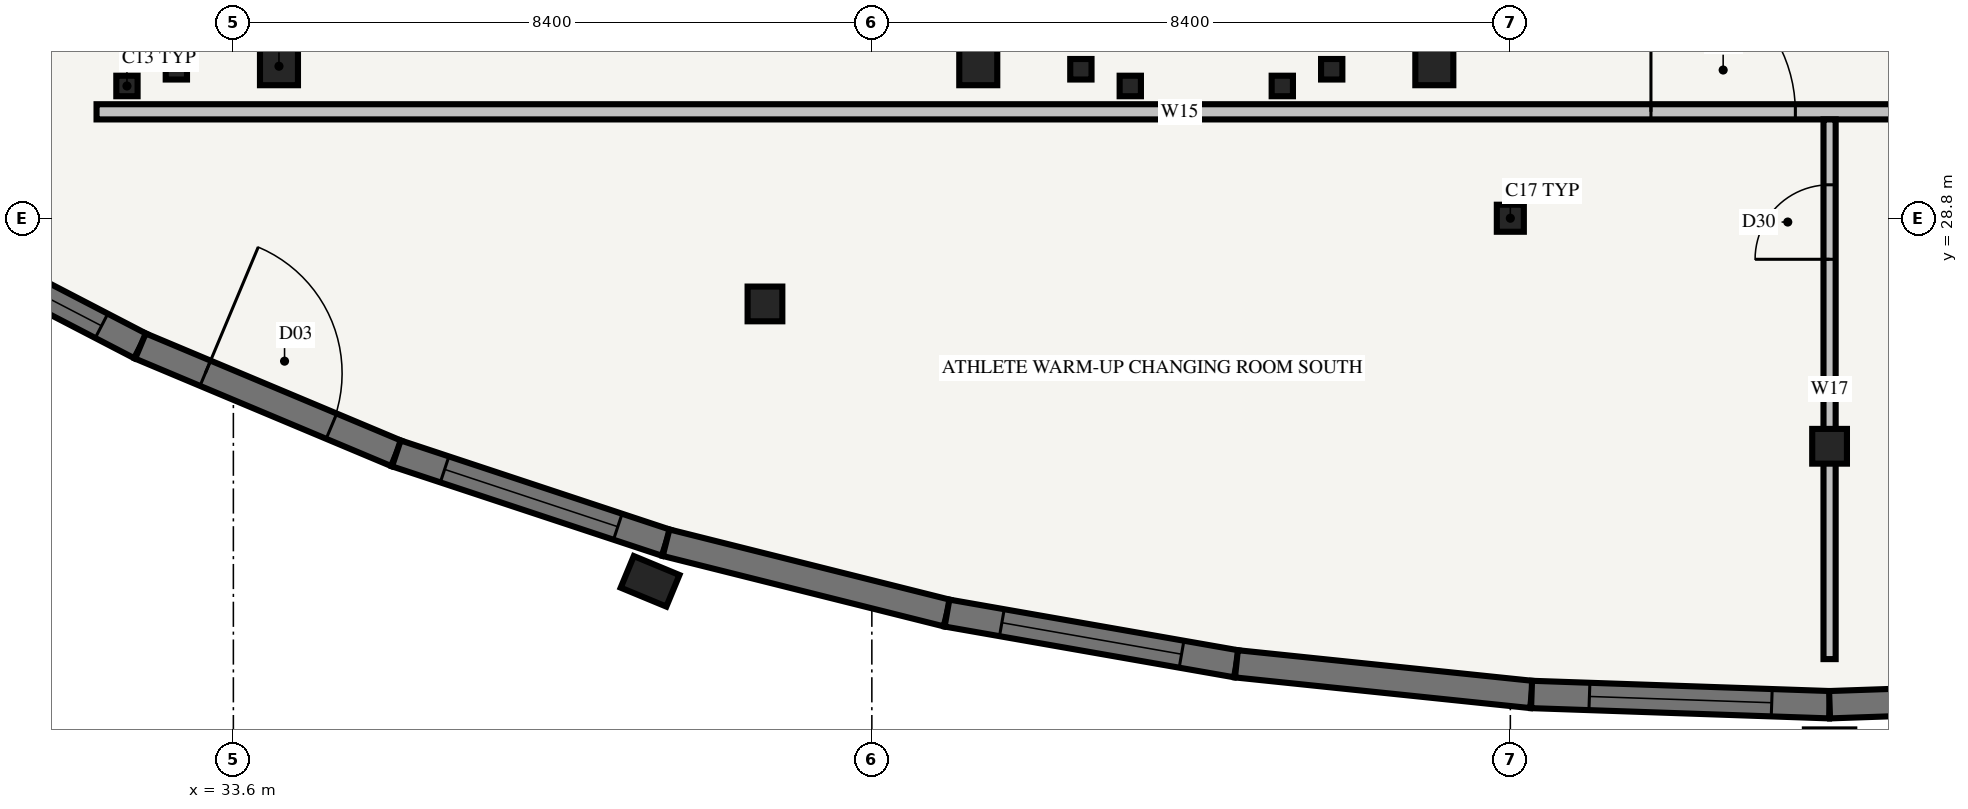
"""IFC4 building model, lengths in metres.
Left out: names, types, materials, properties, quantities, classifications, styles, units other than length and angle.
Written with IfcOpenShell. Run it as: python <this file> out.ifc"""

import sys

from ifc_helpers import new_model, si_unit, direction, frame, frame_2d, origin, origin_2d, place, context, subcontext, project, spatial, rectangle, hollow_circle, i_section, extrude, element, fill, save


model = new_model("IFC4")
c1 = context("Model", 3, precision=1e-05, world=origin(), true_north=direction((0.0, 1.0)))
c2 = subcontext(c1, "Body", "Model", "MODEL_VIEW")
j1 = project(units=[si_unit("LENGTHUNIT", "METRE"), si_unit("PLANEANGLEUNIT", "RADIAN")], contexts=[c1])
p1 = place(None, origin())
s1 = spatial("IfcSite", under=j1, at=p1, CompositionType="ELEMENT")
p2 = place(p1, origin())
s2 = spatial("IfcBuilding", under=s1, at=p2, CompositionType="ELEMENT")
p3 = place(p2, origin())
s3 = spatial("IfcBuildingStorey", under=s2, at=p3, CompositionType="ELEMENT", Elevation=0.0)
for number, where, z_axis, x_axis in (
    (1, (32.2, 30.54, 0.0), (0.0, 0.0, 1.0), (1.0, 0.0, 0.0)),
    (2, (45.4, 30.54, 0.0), (0.0, 0.0, 1.0), (1.0, 0.0, 0.0)),
    (3, (32.85, 30.76, 0.0), (0.0, 0.0, 1.0), (1.0, 0.0, 0.0)),
    (4, (44.75, 30.76, 0.0), (0.0, 0.0, 1.0), (1.0, 0.0, 0.0)),
    (5, (47.4, 30.54, 0.0), (0.0, 0.0, 1.0), (1.0, 0.0, 0.0)),
    (6, (48.05, 30.76, 0.0), (0.0, 0.0, 1.0), (1.0, 0.0, 0.0)),
):
    element("IfcColumn", number, at=place(p3, frame(where, z_axis=z_axis, x_axis=x_axis)), inside=s3, PredefinedType="COLUMN", context=c2, shape_type="SweptSolid", body=[
        extrude(i_section(OverallWidth=0.28, OverallDepth=0.27, WebThickness=0.008, FlangeThickness=0.013, FilletRadius=0.024, at=origin_2d()), origin(), (0.0, 0.0, 1.0), 3.99),
    ])
p4 = place(p3, frame((40.594, 27.673, -0.42), z_axis=(0.0, 0.0, 1.0), x_axis=(1.0, 0.0, 0.0)))
e7 = element("IfcColumn", 7, at=p4, inside=s3, PredefinedType="COLUMN", context=c2, shape_type="SweptSolid", body=[
    extrude(hollow_circle(Radius=0.229, WallThickness=0.02, at=origin_2d()), origin(), (0.0, 0.0, 1.0), 4.92),
])
p5 = place(p3, frame((39.082, 24.023, -0.42), z_axis=(0.0, 0.0, 1.0), x_axis=(-0.382683432365, -0.923879532511, 0.0)))
e8 = element("IfcColumn", 8, at=p5, inside=s3, PredefinedType="PILASTER", context=c2, shape_type="SweptSolid", body=[
    extrude(rectangle(XDim=0.45, YDim=0.65, at=origin_2d()), origin(), (0.0, 0.0, 1.0), 4.92),
])
p6 = place(p3, frame((54.6, 25.8, -0.42), z_axis=(0.0, 0.0, 1.0), x_axis=(1.0, 0.0, 0.0)))
e9 = element("IfcColumn", 9, at=p6, inside=s3, PredefinedType="COLUMN", context=c2, shape_type="SweptSolid", body=[
    extrude(hollow_circle(Radius=0.229, WallThickness=0.02, at=origin_2d()), origin(), (0.0, 0.0, 1.0), 4.92),
])
p7 = place(p3, frame((50.4, 28.8, -0.42), z_axis=(0.0, 0.0, 1.0), x_axis=(1.0, 0.0, 0.0)))
e10 = element("IfcColumn", 10, at=p7, inside=s3, PredefinedType="COLUMN", context=c2, shape_type="SweptSolid", body=[
    extrude(hollow_circle(Radius=0.178, WallThickness=0.016, at=origin_2d()), origin(), (0.0, 0.0, 1.0), 4.92),
])
for number, where, z_axis, x_axis in (
    (11, (34.2, 30.8, 0.0), (0.0, 0.0, 1.0), (1.0, 0.0, 0.0)),
    (12, (43.4, 30.8, 0.0), (0.0, 0.0, 1.0), (1.0, 0.0, 0.0)),
    (13, (49.4, 30.8, 0.0), (0.0, 0.0, 1.0), (1.0, 0.0, 0.0)),
):
    element("IfcColumn", number, at=place(p3, frame(where, z_axis=z_axis, x_axis=x_axis)), inside=s3, PredefinedType="COLUMN", context=c2, shape_type="SweptSolid", body=[
        extrude(rectangle(XDim=0.5, YDim=0.5, at=origin_2d()), origin(), (0.0, 0.0, 1.0), 3.63),
    ])
p8 = place(p3, frame((29.224, 28.756, 0.0), z_axis=(0.0, 0.0, 1.0), x_axis=(0.887533910416, -0.460742398593, 0.0)))
e14 = element("IfcWall", 14, at=p8, inside=s3, PredefinedType="STANDARD", context=c2, shape_type="SweptSolid", body=[
    extrude(rectangle(XDim=3.552, YDim=0.36, at=frame_2d((1.776, 0.0))), origin(), (0.0, 0.0, 1.0), 4.01),
])
p9 = place(p8, frame((0.576, 0.0, 2.65)))
e15 = element("IfcOpeningElement", 15, at=p9, cuts=e14, PredefinedType="OPENING", context=c2, shape_type="SweptSolid", body=[
    extrude(rectangle(XDim=2.4, YDim=1.1, at=frame_2d((1.2, 0.55))), frame((0.0, 0.205, 0.0), z_axis=(0.0, -1.0, 0.0), x_axis=(1.0, 0.0, 0.0)), (0.0, 0.0, 1.0), 0.41),
])
p10 = place(p3, frame((32.377, 27.119, 0.0), z_axis=(0.0, 0.0, 1.0), x_axis=(0.922130522386, -0.386878921219, 0.0)))
e16 = element("IfcWall", 16, at=p10, inside=s3, PredefinedType="STANDARD", context=c2, shape_type="SweptSolid", body=[
    extrude(rectangle(XDim=3.651, YDim=0.36, at=frame_2d((1.826, 0.0))), origin(), (0.0, 0.0, 1.0), 4.01),
])
p11 = place(p10, frame((0.926, 0.0, 0.0)))
e17 = element("IfcOpeningElement", 17, at=p11, cuts=e16, PredefinedType="OPENING", context=c2, shape_type="SweptSolid", body=[
    extrude(rectangle(XDim=1.8, YDim=2.4, at=frame_2d((0.9, 1.2))), frame((0.0, 0.205, 0.0), z_axis=(0.0, -1.0, 0.0), x_axis=(1.0, 0.0, 0.0)), (0.0, 0.0, 1.0), 0.41),
])
p12 = place(p3, frame((35.744, 25.706, 0.0), z_axis=(0.0, 0.0, 1.0), x_axis=(0.949327915917, -0.314287301781, 0.0)))
e18 = element("IfcWall", 18, at=p12, inside=s3, PredefinedType="STANDARD", context=c2, shape_type="SweptSolid", body=[
    extrude(rectangle(XDim=3.738, YDim=0.36, at=frame_2d((1.869, 0.0))), origin(), (0.0, 0.0, 1.0), 4.01),
])
p13 = place(p12, frame((0.669, 0.0, 2.65)))
e19 = element("IfcOpeningElement", 19, at=p13, cuts=e18, PredefinedType="OPENING", context=c2, shape_type="SweptSolid", body=[
    extrude(rectangle(XDim=2.4, YDim=1.1, at=frame_2d((1.2, 0.55))), frame((0.0, 0.205, 0.0), z_axis=(0.0, -1.0, 0.0), x_axis=(1.0, 0.0, 0.0)), (0.0, 0.0, 1.0), 0.41),
])
p14 = place(p3, frame((39.293, 24.531, 0.0), z_axis=(0.0, 0.0, 1.0), x_axis=(0.970029313946, -0.242987921686, 0.0)))
e20 = element("IfcWall", 20, at=p14, inside=s3, PredefinedType="STANDARD", context=c2, shape_type="SweptSolid", body=[
    extrude(rectangle(XDim=3.81, YDim=0.36, at=frame_2d((1.905, 0.0))), origin(), (0.0, 0.0, 1.0), 4.01),
])
p15 = place(p3, frame((42.989, 23.606, 0.0), z_axis=(0.0, 0.0, 1.0), x_axis=(0.984971163925, -0.172718864739, 0.0)))
e21 = element("IfcWall", 21, at=p15, inside=s3, PredefinedType="STANDARD", context=c2, shape_type="SweptSolid", body=[
    extrude(rectangle(XDim=3.866, YDim=0.36, at=frame_2d((1.933, 0.0))), origin(), (0.0, 0.0, 1.0), 4.01),
])
p16 = place(p15, frame((0.733, 0.0, 2.65)))
e22 = element("IfcOpeningElement", 22, at=p16, cuts=e21, PredefinedType="OPENING", context=c2, shape_type="SweptSolid", body=[
    extrude(rectangle(XDim=2.4, YDim=1.1, at=frame_2d((1.2, 0.55))), frame((0.0, 0.205, 0.0), z_axis=(0.0, -1.0, 0.0), x_axis=(1.0, 0.0, 0.0)), (0.0, 0.0, 1.0), 0.41),
])
p17 = place(p3, frame((46.796, 22.938, 0.0), z_axis=(0.0, 0.0, 1.0), x_axis=(0.994654867494, -0.103255482032, 0.0)))
e23 = element("IfcWall", 23, at=p17, inside=s3, PredefinedType="STANDARD", context=c2, shape_type="SweptSolid", body=[
    extrude(rectangle(XDim=3.904, YDim=0.36, at=frame_2d((1.952, 0.0))), origin(), (0.0, 0.0, 1.0), 4.01),
])
p18 = place(p3, frame((50.679, 22.535, 0.0), z_axis=(0.0, 0.0, 1.0), x_axis=(0.999407697997, -0.034412979887, 0.0)))
e24 = element("IfcWall", 24, at=p18, inside=s3, PredefinedType="STANDARD", context=c2, shape_type="SweptSolid", body=[
    extrude(rectangle(XDim=3.923, YDim=0.36, at=frame_2d((1.962, 0.0))), origin(), (0.0, 0.0, 1.0), 4.01),
])
p19 = place(p18, frame((0.761, 0.0, 2.65)))
e25 = element("IfcOpeningElement", 25, at=p19, cuts=e24, PredefinedType="OPENING", context=c2, shape_type="SweptSolid", body=[
    extrude(rectangle(XDim=2.4, YDim=1.1, at=frame_2d((1.2, 0.55))), frame((0.0, 0.205, 0.0), z_axis=(0.0, -1.0, 0.0), x_axis=(1.0, 0.0, 0.0)), (0.0, 0.0, 1.0), 0.41),
])
p20 = place(p3, frame((54.6, 22.4, 0.0), z_axis=(0.0, 0.0, 1.0), x_axis=(0.999407624294, 0.034415120259, 0.0)))
e26 = element("IfcWall", 26, at=p20, inside=s3, PredefinedType="STANDARD", context=c2, shape_type="SweptSolid", body=[
    extrude(rectangle(XDim=3.923, YDim=0.36, at=frame_2d((1.961, 0.0))), origin(), (0.0, 0.0, 1.0), 4.01),
])
p21 = place(p3, frame((31.8, 30.2, 0.0), z_axis=(0.0, 0.0, 1.0), x_axis=(1.0, 0.0, 0.0)))
e27 = element("IfcWall", 27, at=p21, inside=s3, PredefinedType="PARTITIONING", context=c2, shape_type="SweptSolid", body=[
    extrude(rectangle(XDim=45.6, YDim=0.2, at=frame_2d((22.8, 0.0))), origin(), (0.0, 0.0, 1.0), 3.62),
])
p22 = place(p21, frame((20.45, 0.0, 0.0)))
e28 = element("IfcOpeningElement", 28, at=p22, cuts=e27, PredefinedType="OPENING", context=c2, shape_type="SweptSolid", body=[
    extrude(rectangle(XDim=1.9, YDim=2.35, at=frame_2d((0.95, 1.175))), frame((0.0, 0.125, 0.0), z_axis=(0.0, -1.0, 0.0), x_axis=(1.0, 0.0, 0.0)), (0.0, 0.0, 1.0), 0.25),
])
p23 = place(p3, frame((54.6, 23.0, 0.0), z_axis=(0.0, 0.0, 1.0), x_axis=(0.0, 1.0, 0.0)))
e29 = element("IfcWall", 29, at=p23, inside=s3, PredefinedType="PARTITIONING", context=c2, shape_type="SweptSolid", body=[
    extrude(rectangle(XDim=7.1, YDim=0.16, at=frame_2d((3.55, 0.0))), origin(), (0.0, 0.0, 1.0), 3.62),
])
p24 = place(p23, frame((5.26, 0.0, 0.0)))
e30 = element("IfcOpeningElement", 30, at=p24, cuts=e29, PredefinedType="OPENING", context=c2, shape_type="SweptSolid", body=[
    extrude(rectangle(XDim=0.98, YDim=2.1, at=frame_2d((0.49, 1.05))), frame((0.0, 0.105, 0.0), z_axis=(0.0, -1.0, 0.0), x_axis=(1.0, 0.0, 0.0)), (0.0, 0.0, 1.0), 0.21),
])
p25 = place(p9, origin())
e31 = element("IfcWindow", 31, at=p25, inside=s3, PartitioningType="SINGLE_PANEL", PredefinedType="WINDOW", context=c2, shape_type="SweptSolid", body=[
    extrude(rectangle(XDim=2.4, YDim=1.1, at=frame_2d((1.2, 0.55))), frame((0.0, 0.03, 0.0), z_axis=(0.0, -1.0, 0.0), x_axis=(1.0, 0.0, 0.0)), (0.0, 0.0, 1.0), 0.06),
])
fill(e15, e31)
p26 = place(p11, frame((1.8, 0.0, 0.0), z_axis=(0.0, 0.0, 1.0), x_axis=(-1.0, 0.0, 0.0)))
e32 = element("IfcDoor", 32, at=p26, inside=s3, OperationType="DOUBLE_DOOR_SINGLE_SWING", PredefinedType="DOOR", context=c2, shape_type="SweptSolid", body=[
    extrude(rectangle(XDim=1.8, YDim=2.4, at=frame_2d((0.9, 1.2))), frame((0.0, 0.025, 0.0), z_axis=(0.0, -1.0, 0.0), x_axis=(1.0, 0.0, 0.0)), (0.0, 0.0, 1.0), 0.05),
])
fill(e17, e32)
p27 = place(p13, origin())
e33 = element("IfcWindow", 33, at=p27, inside=s3, PartitioningType="SINGLE_PANEL", PredefinedType="WINDOW", context=c2, shape_type="SweptSolid", body=[
    extrude(rectangle(XDim=2.4, YDim=1.1, at=frame_2d((1.2, 0.55))), frame((0.0, 0.03, 0.0), z_axis=(0.0, -1.0, 0.0), x_axis=(1.0, 0.0, 0.0)), (0.0, 0.0, 1.0), 0.06),
])
fill(e19, e33)
p28 = place(p16, origin())
e34 = element("IfcWindow", 34, at=p28, inside=s3, PartitioningType="SINGLE_PANEL", PredefinedType="WINDOW", context=c2, shape_type="SweptSolid", body=[
    extrude(rectangle(XDim=2.4, YDim=1.1, at=frame_2d((1.2, 0.55))), frame((0.0, 0.03, 0.0), z_axis=(0.0, -1.0, 0.0), x_axis=(1.0, 0.0, 0.0)), (0.0, 0.0, 1.0), 0.06),
])
fill(e22, e34)
p29 = place(p19, origin())
e35 = element("IfcWindow", 35, at=p29, inside=s3, PartitioningType="SINGLE_PANEL", PredefinedType="WINDOW", context=c2, shape_type="SweptSolid", body=[
    extrude(rectangle(XDim=2.4, YDim=1.1, at=frame_2d((1.2, 0.55))), frame((0.0, 0.03, 0.0), z_axis=(0.0, -1.0, 0.0), x_axis=(1.0, 0.0, 0.0)), (0.0, 0.0, 1.0), 0.06),
])
fill(e25, e35)
p30 = place(p22, origin())
e36 = element("IfcDoor", 36, at=p30, inside=s3, OperationType="DOUBLE_DOOR_SINGLE_SWING", PredefinedType="DOOR", context=c2, shape_type="SweptSolid", body=[
    extrude(rectangle(XDim=1.9, YDim=2.35, at=frame_2d((0.95, 1.175))), frame((0.0, 0.025, 0.0), z_axis=(0.0, -1.0, 0.0), x_axis=(1.0, 0.0, 0.0)), (0.0, 0.0, 1.0), 0.05),
])
fill(e28, e36)
p31 = place(p24, frame((0.98, 0.0, 0.0), z_axis=(0.0, 0.0, 1.0), x_axis=(-1.0, 0.0, 0.0)))
e37 = element("IfcDoor", 37, at=p31, inside=s3, OperationType="SINGLE_SWING_LEFT", PredefinedType="DOOR", context=c2, shape_type="SweptSolid", body=[
    extrude(rectangle(XDim=0.98, YDim=2.1, at=frame_2d((0.49, 1.05))), frame((0.0, 0.025, 0.0), z_axis=(0.0, -1.0, 0.0), x_axis=(1.0, 0.0, 0.0)), (0.0, 0.0, 1.0), 0.05),
])
fill(e30, e37)
save(model, sys.argv[1])
